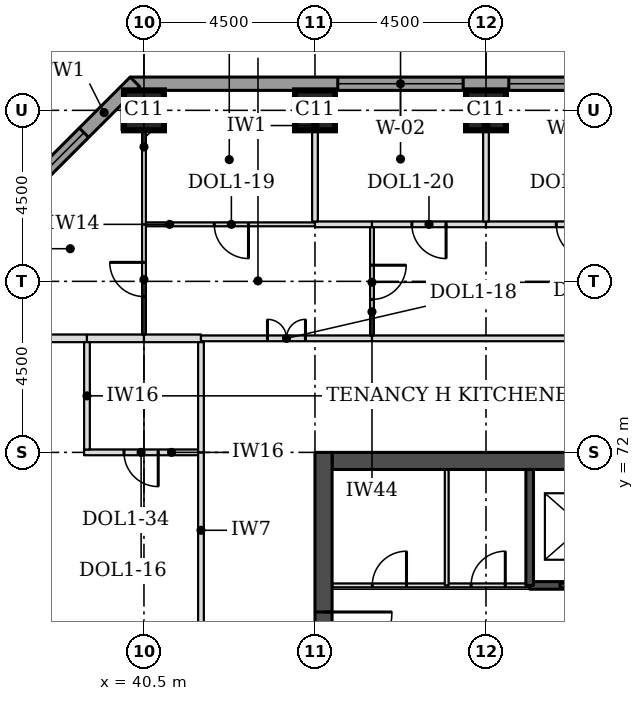
"""IFC4 building model, lengths in metres.
Left out: names, types, materials, properties, quantities, classifications, styles, units other than length and angle.
Written with IfcOpenShell. Run it as: python <this file> out.ifc"""

import sys

from ifc_helpers import new_model, si_unit, direction, frame, frame_2d, origin, origin_2d, place, context, subcontext, project, spatial, rectangle, extrude, element, fill, save


model = new_model("IFC4")
c1 = context("Model", 3, precision=1e-05, world=origin(), true_north=direction((0.0, 1.0)))
c2 = subcontext(c1, "Body", "Model", "MODEL_VIEW")
j1 = project(units=[si_unit("LENGTHUNIT", "METRE"), si_unit("PLANEANGLEUNIT", "RADIAN")], contexts=[c1])
p1 = place(None, origin())
s1 = spatial("IfcSite", under=j1, at=p1, CompositionType="ELEMENT")
p2 = place(p1, origin())
s2 = spatial("IfcBuilding", under=s1, at=p2, CompositionType="ELEMENT")
p3 = place(p2, frame((0.0, 0.0, 82.6)))
s3 = spatial("IfcBuildingStorey", under=s2, at=p3, CompositionType="ELEMENT", Elevation=82.6)
for number, where, z_axis, x_axis in (
    (1, (40.5, 81.0, 0.0), (0.0, 0.0, 1.0), (1.0, 0.0, 0.0)),
    (2, (45.0, 81.0, 0.0), (0.0, 0.0, 1.0), (1.0, 0.0, 0.0)),
    (3, (49.5, 81.0, 0.0), (0.0, 0.0, 1.0), (1.0, 0.0, 0.0)),
):
    element("IfcColumn", number, at=place(p3, frame(where, z_axis=z_axis, x_axis=x_axis)), inside=s3, PredefinedType="COLUMN", context=c2, shape_type="SweptSolid", body=[
        extrude(rectangle(XDim=1.05, YDim=1.05, at=origin_2d()), origin(), (0.0, 0.0, 1.0), 3.7),
    ])
p4 = place(p3, frame((45.45, 71.775, 0.0), z_axis=(0.0, 0.0, 1.0), x_axis=(1.0, 0.0, 0.0)))
e4 = element("IfcWall", 4, at=p4, inside=s3, PredefinedType="SHEAR", context=c2, shape_type="SweptSolid", body=[
    extrude(rectangle(XDim=21.6, YDim=0.45, at=frame_2d((10.8, 0.0))), origin(), (0.0, 0.0, 1.0), 3.7),
])
p5 = place(p3, frame((45.225, 49.5, 0.0), z_axis=(0.0, 0.0, 1.0), x_axis=(0.0, 1.0, 0.0)))
e5 = element("IfcWall", 5, at=p5, inside=s3, PredefinedType="SHEAR", context=c2, shape_type="SweptSolid", body=[
    extrude(rectangle(XDim=22.5, YDim=0.45, at=frame_2d((11.25, 0.0))), origin(), (0.0, 0.0, 1.0), 3.7),
])
p6 = place(p5, frame((4.2, 0.0, 0.0)))
e6 = element("IfcOpeningElement", 6, at=p6, cuts=e5, PredefinedType="OPENING", context=c2, shape_type="SweptSolid", body=[
    extrude(rectangle(XDim=1.8, YDim=2.1, at=frame_2d((0.9, 1.05))), frame((0.0, 0.235, 0.0), z_axis=(0.0, -1.0, 0.0), x_axis=(1.0, 0.0, 0.0)), (0.0, 0.0, 1.0), 0.47),
])
p7 = place(p5, frame((6.9, 0.0, 0.0)))
e7 = element("IfcOpeningElement", 7, at=p7, cuts=e5, PredefinedType="OPENING", context=c2, shape_type="SweptSolid", body=[
    extrude(rectangle(XDim=1.1, YDim=2.1, at=frame_2d((0.55, 1.05))), frame((0.0, 0.235, 0.0), z_axis=(0.0, -1.0, 0.0), x_axis=(1.0, 0.0, 0.0)), (0.0, 0.0, 1.0), 0.47),
])
p8 = place(p5, frame((13.6, 0.0, 0.0)))
e8 = element("IfcOpeningElement", 8, at=p8, cuts=e5, PredefinedType="OPENING", context=c2, shape_type="SweptSolid", body=[
    extrude(rectangle(XDim=1.1, YDim=2.1, at=frame_2d((0.55, 1.05))), frame((0.0, 0.235, 0.0), z_axis=(0.0, -1.0, 0.0), x_axis=(1.0, 0.0, 0.0)), (0.0, 0.0, 1.0), 0.47),
])
p9 = place(p5, frame((16.5, 0.0, 0.0)))
e9 = element("IfcOpeningElement", 9, at=p9, cuts=e5, PredefinedType="OPENING", context=c2, shape_type="SweptSolid", body=[
    extrude(rectangle(XDim=1.8, YDim=2.1, at=frame_2d((0.9, 1.05))), frame((0.0, 0.235, 0.0), z_axis=(0.0, -1.0, 0.0), x_axis=(1.0, 0.0, 0.0)), (0.0, 0.0, 1.0), 0.47),
])
p10 = place(p3, frame((72.362, 81.7, 0.0), z_axis=(0.0, 0.0, 1.0), x_axis=(-1.0, 0.0, 0.0)))
e10 = element("IfcWall", 10, at=p10, inside=s3, PredefinedType="STANDARD", context=c2, shape_type="SweptSolid", body=[
    extrude(rectangle(XDim=32.225, YDim=0.35, at=frame_2d((16.112, 0.0))), origin(), (0.0, 0.0, 1.0), 3.525),
])
p11 = place(p10, frame((5.462, 0.0, 0.9)))
e11 = element("IfcOpeningElement", 11, at=p11, cuts=e10, PredefinedType="OPENING", context=c2, shape_type="SweptSolid", body=[
    extrude(rectangle(XDim=3.3, YDim=1.9, at=frame_2d((1.65, 0.95))), frame((0.0, 0.185, 0.0), z_axis=(0.0, -1.0, 0.0), x_axis=(1.0, 0.0, 0.0)), (0.0, 0.0, 1.0), 0.37),
])
p12 = place(p10, frame((9.962, 0.0, 0.9)))
e12 = element("IfcOpeningElement", 12, at=p12, cuts=e10, PredefinedType="OPENING", context=c2, shape_type="SweptSolid", body=[
    extrude(rectangle(XDim=3.3, YDim=1.9, at=frame_2d((1.65, 0.95))), frame((0.0, 0.185, 0.0), z_axis=(0.0, -1.0, 0.0), x_axis=(1.0, 0.0, 0.0)), (0.0, 0.0, 1.0), 0.37),
])
p13 = place(p10, frame((14.462, 0.0, 0.9)))
e13 = element("IfcOpeningElement", 13, at=p13, cuts=e10, PredefinedType="OPENING", context=c2, shape_type="SweptSolid", body=[
    extrude(rectangle(XDim=3.3, YDim=1.9, at=frame_2d((1.65, 0.95))), frame((0.0, 0.185, 0.0), z_axis=(0.0, -1.0, 0.0), x_axis=(1.0, 0.0, 0.0)), (0.0, 0.0, 1.0), 0.37),
])
p14 = place(p10, frame((18.962, 0.0, 0.9)))
e14 = element("IfcOpeningElement", 14, at=p14, cuts=e10, PredefinedType="OPENING", context=c2, shape_type="SweptSolid", body=[
    extrude(rectangle(XDim=3.3, YDim=1.9, at=frame_2d((1.65, 0.95))), frame((0.0, 0.185, 0.0), z_axis=(0.0, -1.0, 0.0), x_axis=(1.0, 0.0, 0.0)), (0.0, 0.0, 1.0), 0.37),
])
p15 = place(p10, frame((23.462, 0.0, 0.9)))
e15 = element("IfcOpeningElement", 15, at=p15, cuts=e10, PredefinedType="OPENING", context=c2, shape_type="SweptSolid", body=[
    extrude(rectangle(XDim=3.3, YDim=1.9, at=frame_2d((1.65, 0.95))), frame((0.0, 0.185, 0.0), z_axis=(0.0, -1.0, 0.0), x_axis=(1.0, 0.0, 0.0)), (0.0, 0.0, 1.0), 0.37),
])
p16 = place(p3, frame((40.261, 81.751, 0.0), z_axis=(0.0, 0.0, 1.0), x_axis=(-0.707106781187, -0.707106781187, 0.0)))
e16 = element("IfcWall", 16, at=p16, inside=s3, PredefinedType="STANDARD", context=c2, shape_type="SweptSolid", body=[
    extrude(rectangle(XDim=7.089, YDim=0.35, at=frame_2d((3.544, 0.0))), origin(), (0.0, 0.0, 1.0), 3.525),
])
p17 = place(p16, frame((1.894, 0.0, 0.9)))
e17 = element("IfcOpeningElement", 17, at=p17, cuts=e16, PredefinedType="OPENING", context=c2, shape_type="SweptSolid", body=[
    extrude(rectangle(XDim=3.3, YDim=1.9, at=frame_2d((1.65, 0.95))), frame((0.0, 0.185, 0.0), z_axis=(0.0, -1.0, 0.0), x_axis=(1.0, 0.0, 0.0)), (0.0, 0.0, 1.0), 0.37),
])
p18 = place(p3, frame((38.925, 72.0, 0.0), z_axis=(0.0, 0.0, 1.0), x_axis=(1.0, 0.0, 0.0)))
e18 = element("IfcWall", 18, at=p18, inside=s3, PredefinedType="PARTITIONING", context=c2, shape_type="SweptSolid", body=[
    extrude(rectangle(XDim=3.0, YDim=0.15, at=frame_2d((1.5, 0.0))), origin(), (0.0, 0.0, 1.0), 3.55),
])
p19 = place(p18, frame((1.05, 0.0, 0.0)))
e19 = element("IfcOpeningElement", 19, at=p19, cuts=e18, PredefinedType="OPENING", context=c2, shape_type="SweptSolid", body=[
    extrude(rectangle(XDim=0.9, YDim=2.1, at=frame_2d((0.45, 1.05))), frame((0.0, 0.085, 0.0), z_axis=(0.0, -1.0, 0.0), x_axis=(1.0, 0.0, 0.0)), (0.0, 0.0, 1.0), 0.17),
])
p20 = place(p3, frame((35.475, 75.0, 0.0), z_axis=(0.0, 0.0, 1.0), x_axis=(1.0, 0.0, 0.0)))
e20 = element("IfcWall", 20, at=p20, inside=s3, PredefinedType="PARTITIONING", context=c2, shape_type="SweptSolid", body=[
    extrude(rectangle(XDim=3.525, YDim=0.2, at=frame_2d((1.762, 0.0))), origin(), (0.0, 0.0, 1.0), 3.55),
])
for number, where, z_axis, x_axis in (
    (21, (39.0, 75.0, 0.0), (0.0, 0.0, 1.0), (1.0, 0.0, 0.0)),
    (22, (40.5, 75.0, 0.0), (0.0, 0.0, 1.0), (1.0, 0.0, 0.0)),
):
    element("IfcWall", number, at=place(p3, frame(where, z_axis=z_axis, x_axis=x_axis)), inside=s3, PredefinedType="PARTITIONING", context=c2, shape_type="SweptSolid", body=[
        extrude(rectangle(XDim=1.5, YDim=0.2, at=frame_2d((0.75, 0.0))), origin(), (0.0, 0.0, 1.0), 3.55),
    ])
p21 = place(p3, frame((42.0, 75.0, 0.0), z_axis=(0.0, 0.0, 1.0), x_axis=(1.0, 0.0, 0.0)))
e23 = element("IfcWall", 23, at=p21, inside=s3, PredefinedType="PARTITIONING", context=c2, shape_type="SweptSolid", body=[
    extrude(rectangle(XDim=4.5, YDim=0.15, at=frame_2d((2.25, 0.0))), origin(), (0.0, 0.0, 1.0), 3.55),
])
p22 = place(p21, frame((1.75, 0.0, 0.0)))
e24 = element("IfcOpeningElement", 24, at=p22, cuts=e23, PredefinedType="OPENING", context=c2, shape_type="SweptSolid", body=[
    extrude(rectangle(XDim=1.0, YDim=2.1, at=frame_2d((0.5, 1.05))), frame((0.0, 0.085, 0.0), z_axis=(0.0, -1.0, 0.0), x_axis=(1.0, 0.0, 0.0)), (0.0, 0.0, 1.0), 0.17),
])
p23 = place(p3, frame((46.5, 75.0, 0.0), z_axis=(0.0, 0.0, 1.0), x_axis=(1.0, 0.0, 0.0)))
e25 = element("IfcWall", 25, at=p23, inside=s3, PredefinedType="PARTITIONING", context=c2, shape_type="SweptSolid", body=[
    extrude(rectangle(XDim=24.0, YDim=0.15, at=frame_2d((12.0, 0.0))), origin(), (0.0, 0.0, 1.0), 3.55),
])
p24 = place(p3, frame((40.55, 78.0, 0.0), z_axis=(0.0, 0.0, 1.0), x_axis=(1.0, 0.0, 0.0)))
e26 = element("IfcWall", 26, at=p24, inside=s3, PredefinedType="PARTITIONING", context=c2, shape_type="SweptSolid", body=[
    extrude(rectangle(XDim=4.45, YDim=0.1, at=frame_2d((2.225, 0.0))), origin(), (0.0, 0.0, 1.0), 3.55),
])
p25 = place(p24, frame((1.8, 0.0, 0.0)))
e27 = element("IfcOpeningElement", 27, at=p25, cuts=e26, PredefinedType="OPENING", context=c2, shape_type="SweptSolid", body=[
    extrude(rectangle(XDim=0.9, YDim=2.1, at=frame_2d((0.45, 1.05))), frame((0.0, 0.06, 0.0), z_axis=(0.0, -1.0, 0.0), x_axis=(1.0, 0.0, 0.0)), (0.0, 0.0, 1.0), 0.12),
])
p26 = place(p3, frame((45.0, 78.0, 0.0), z_axis=(0.0, 0.0, 1.0), x_axis=(1.0, 0.0, 0.0)))
e28 = element("IfcWall", 28, at=p26, inside=s3, PredefinedType="PARTITIONING", context=c2, shape_type="SweptSolid", body=[
    extrude(rectangle(XDim=1.5, YDim=0.15, at=frame_2d((0.75, 0.0))), origin(), (0.0, 0.0, 1.0), 3.55),
])
p27 = place(p3, frame((46.5, 78.0, 0.0), z_axis=(0.0, 0.0, 1.0), x_axis=(1.0, 0.0, 0.0)))
e29 = element("IfcWall", 29, at=p27, inside=s3, PredefinedType="PARTITIONING", context=c2, shape_type="SweptSolid", body=[
    extrude(rectangle(XDim=3.0, YDim=0.15, at=frame_2d((1.5, 0.0))), origin(), (0.0, 0.0, 1.0), 3.55),
])
p28 = place(p27, frame((1.05, 0.0, 0.0)))
e30 = element("IfcOpeningElement", 30, at=p28, cuts=e29, PredefinedType="OPENING", context=c2, shape_type="SweptSolid", body=[
    extrude(rectangle(XDim=0.9, YDim=2.1, at=frame_2d((0.45, 1.05))), frame((0.0, 0.085, 0.0), z_axis=(0.0, -1.0, 0.0), x_axis=(1.0, 0.0, 0.0)), (0.0, 0.0, 1.0), 0.17),
])
p29 = place(p3, frame((49.5, 78.0, 0.0), z_axis=(0.0, 0.0, 1.0), x_axis=(1.0, 0.0, 0.0)))
e31 = element("IfcWall", 31, at=p29, inside=s3, PredefinedType="PARTITIONING", context=c2, shape_type="SweptSolid", body=[
    extrude(rectangle(XDim=4.575, YDim=0.15, at=frame_2d((2.288, 0.0))), origin(), (0.0, 0.0, 1.0), 3.55),
])
p30 = place(p29, frame((1.85, 0.0, 0.0)))
e32 = element("IfcOpeningElement", 32, at=p30, cuts=e31, PredefinedType="OPENING", context=c2, shape_type="SweptSolid", body=[
    extrude(rectangle(XDim=0.9, YDim=2.1, at=frame_2d((0.45, 1.05))), frame((0.0, 0.085, 0.0), z_axis=(0.0, -1.0, 0.0), x_axis=(1.0, 0.0, 0.0)), (0.0, 0.0, 1.0), 0.17),
])
p31 = place(p3, frame((42.0, 61.5, 0.0), z_axis=(0.0, 0.0, 1.0), x_axis=(0.0, 1.0, 0.0)))
e33 = element("IfcWall", 33, at=p31, inside=s3, PredefinedType="PARTITIONING", context=c2, shape_type="SweptSolid", body=[
    extrude(rectangle(XDim=10.5, YDim=0.15, at=frame_2d((5.25, 0.0))), origin(), (0.0, 0.0, 1.0), 3.55),
])
p32 = place(p3, frame((42.0, 72.0, 0.0), z_axis=(0.0, 0.0, 1.0), x_axis=(0.0, 1.0, 0.0)))
e34 = element("IfcWall", 34, at=p32, inside=s3, PredefinedType="PARTITIONING", context=c2, shape_type="SweptSolid", body=[
    extrude(rectangle(XDim=2.9, YDim=0.15, at=frame_2d((1.45, 0.0))), origin(), (0.0, 0.0, 1.0), 3.55),
])
p33 = place(p3, frame((39.0, 72.075, 0.0), z_axis=(0.0, 0.0, 1.0), x_axis=(0.0, 1.0, 0.0)))
e35 = element("IfcWall", 35, at=p33, inside=s3, PredefinedType="PARTITIONING", context=c2, shape_type="SweptSolid", body=[
    extrude(rectangle(XDim=2.825, YDim=0.15, at=frame_2d((1.413, 0.0))), origin(), (0.0, 0.0, 1.0), 3.55),
])
p34 = place(p3, frame((46.5, 75.075, 0.0), z_axis=(0.0, 0.0, 1.0), x_axis=(0.0, 1.0, 0.0)))
e36 = element("IfcWall", 36, at=p34, inside=s3, PredefinedType="PARTITIONING", context=c2, shape_type="SweptSolid", body=[
    extrude(rectangle(XDim=2.85, YDim=0.1, at=frame_2d((1.425, 0.0))), origin(), (0.0, 0.0, 1.0), 3.022),
])
p35 = place(p34, frame((0.95, 0.0, 0.0)))
e37 = element("IfcOpeningElement", 37, at=p35, cuts=e36, PredefinedType="OPENING", context=c2, shape_type="SweptSolid", body=[
    extrude(rectangle(XDim=0.9, YDim=2.1, at=frame_2d((0.45, 1.05))), frame((0.0, 0.06, 0.0), z_axis=(0.0, -1.0, 0.0), x_axis=(1.0, 0.0, 0.0)), (0.0, 0.0, 1.0), 0.12),
])
p36 = place(p3, frame((40.5, 75.1, 0.0), z_axis=(0.0, 0.0, 1.0), x_axis=(0.0, 1.0, 0.0)))
e38 = element("IfcWall", 38, at=p36, inside=s3, PredefinedType="PARTITIONING", context=c2, shape_type="SweptSolid", body=[
    extrude(rectangle(XDim=2.9, YDim=0.1, at=frame_2d((1.45, 0.0))), origin(), (0.0, 0.0, 1.0), 3.55),
])
p37 = place(p36, frame((1.0, 0.0, 0.0)))
e39 = element("IfcOpeningElement", 39, at=p37, cuts=e38, PredefinedType="OPENING", context=c2, shape_type="SweptSolid", body=[
    extrude(rectangle(XDim=0.9, YDim=2.1, at=frame_2d((0.45, 1.05))), frame((0.0, 0.06, 0.0), z_axis=(0.0, -1.0, 0.0), x_axis=(1.0, 0.0, 0.0)), (0.0, 0.0, 1.0), 0.12),
])
p38 = place(p3, frame((40.5, 78.0, 0.0), z_axis=(0.0, 0.0, 1.0), x_axis=(0.0, 1.0, 0.0)))
e40 = element("IfcWall", 40, at=p38, inside=s3, PredefinedType="PARTITIONING", context=c2, shape_type="SweptSolid", body=[
    extrude(rectangle(XDim=2.475, YDim=0.1, at=frame_2d((1.238, 0.0))), origin(), (0.0, 0.0, 1.0), 3.55),
])
for number, where, z_axis, x_axis in (
    (41, (45.0, 78.075, 0.0), (0.0, 0.0, 1.0), (0.0, 1.0, 0.0)),
    (42, (49.5, 78.075, 0.0), (0.0, 0.0, 1.0), (0.0, 1.0, 0.0)),
):
    element("IfcWall", number, at=place(p3, frame(where, z_axis=z_axis, x_axis=x_axis)), inside=s3, PredefinedType="PARTITIONING", context=c2, shape_type="SweptSolid", body=[
        extrude(rectangle(XDim=3.45, YDim=0.15, at=frame_2d((1.725, 0.0))), origin(), (0.0, 0.0, 1.0), 3.55),
    ])
p39 = place(p3, frame((45.45, 68.5, 0.0), z_axis=(0.0, 0.0, 1.0), x_axis=(1.0, 0.0, 0.0)))
e43 = element("IfcWall", 43, at=p39, inside=s3, PredefinedType="PARTITIONING", context=c2, shape_type="SweptSolid", body=[
    extrude(rectangle(XDim=5.2, YDim=0.1, at=frame_2d((2.6, 0.0))), origin(), (0.0, 0.0, 1.0), 3.55),
])
p40 = place(p39, frame((1.058, 0.0, 0.0)))
e44 = element("IfcOpeningElement", 44, at=p40, cuts=e43, PredefinedType="OPENING", context=c2, shape_type="SweptSolid", body=[
    extrude(rectangle(XDim=0.9, YDim=2.1, at=frame_2d((0.45, 1.05))), frame((0.0, 0.06, 0.0), z_axis=(0.0, -1.0, 0.0), x_axis=(1.0, 0.0, 0.0)), (0.0, 0.0, 1.0), 0.12),
])
p41 = place(p39, frame((3.658, 0.0, 0.0)))
e45 = element("IfcOpeningElement", 45, at=p41, cuts=e43, PredefinedType="OPENING", context=c2, shape_type="SweptSolid", body=[
    extrude(rectangle(XDim=0.9, YDim=2.1, at=frame_2d((0.45, 1.05))), frame((0.0, 0.06, 0.0), z_axis=(0.0, -1.0, 0.0), x_axis=(1.0, 0.0, 0.0)), (0.0, 0.0, 1.0), 0.12),
])
p42 = place(p3, frame((50.65, 68.5, 0.0), z_axis=(0.0, 0.0, 1.0), x_axis=(1.0, 0.0, 0.0)))
e46 = element("IfcWall", 46, at=p42, inside=s3, PredefinedType="SOLIDWALL", context=c2, shape_type="SweptSolid", body=[
    extrude(rectangle(XDim=11.2, YDim=0.2, at=frame_2d((5.6, 0.0))), origin(), (0.0, 0.0, 1.0), 3.55),
])
p43 = place(p42, frame((0.8, 0.0, 0.0)))
e47 = element("IfcOpeningElement", 47, at=p43, cuts=e46, PredefinedType="OPENING", context=c2, shape_type="SweptSolid", body=[
    extrude(rectangle(XDim=1.2, YDim=2.1, at=frame_2d((0.6, 1.05))), frame((0.0, 0.11, 0.0), z_axis=(0.0, -1.0, 0.0), x_axis=(1.0, 0.0, 0.0)), (0.0, 0.0, 1.0), 0.22),
])
p44 = place(p42, frame((3.6, 0.0, 0.0)))
e48 = element("IfcOpeningElement", 48, at=p44, cuts=e46, PredefinedType="OPENING", context=c2, shape_type="SweptSolid", body=[
    extrude(rectangle(XDim=1.2, YDim=2.1, at=frame_2d((0.6, 1.05))), frame((0.0, 0.11, 0.0), z_axis=(0.0, -1.0, 0.0), x_axis=(1.0, 0.0, 0.0)), (0.0, 0.0, 1.0), 0.22),
])
p45 = place(p42, frame((6.4, 0.0, 0.0)))
e49 = element("IfcOpeningElement", 49, at=p45, cuts=e46, PredefinedType="OPENING", context=c2, shape_type="SweptSolid", body=[
    extrude(rectangle(XDim=1.2, YDim=2.1, at=frame_2d((0.6, 1.05))), frame((0.0, 0.11, 0.0), z_axis=(0.0, -1.0, 0.0), x_axis=(1.0, 0.0, 0.0)), (0.0, 0.0, 1.0), 0.22),
])
p46 = place(p42, frame((9.2, 0.0, 0.0)))
e50 = element("IfcOpeningElement", 50, at=p46, cuts=e46, PredefinedType="OPENING", context=c2, shape_type="SweptSolid", body=[
    extrude(rectangle(XDim=1.2, YDim=2.1, at=frame_2d((0.6, 1.05))), frame((0.0, 0.11, 0.0), z_axis=(0.0, -1.0, 0.0), x_axis=(1.0, 0.0, 0.0)), (0.0, 0.0, 1.0), 0.22),
])
p47 = place(p3, frame((48.466, 68.5, 0.0), z_axis=(0.0, 0.0, 1.0), x_axis=(0.0, 1.0, 0.0)))
e51 = element("IfcWall", 51, at=p47, inside=s3, PredefinedType="PARTITIONING", context=c2, shape_type="SweptSolid", body=[
    extrude(rectangle(XDim=3.05, YDim=0.1, at=frame_2d((1.525, 0.0))), origin(), (0.0, 0.0, 1.0), 3.55),
])
p48 = place(p3, frame((50.65, 68.5, 0.0), z_axis=(0.0, 0.0, 1.0), x_axis=(0.0, 1.0, 0.0)))
e52 = element("IfcWall", 52, at=p48, inside=s3, PredefinedType="SOLIDWALL", context=c2, shape_type="SweptSolid", body=[
    extrude(rectangle(XDim=3.05, YDim=0.2, at=frame_2d((1.525, 0.0))), origin(), (0.0, 0.0, 1.0), 3.55),
])
p49 = place(p14, origin())
e53 = element("IfcWindow", 53, at=p49, inside=s3, PartitioningType="SINGLE_PANEL", PredefinedType="WINDOW", context=c2, shape_type="SweptSolid", body=[
    extrude(rectangle(XDim=3.3, YDim=1.9, at=frame_2d((1.65, 0.95))), frame((0.0, 0.085, 0.0), z_axis=(0.0, -1.0, 0.0), x_axis=(1.0, 0.0, 0.0)), (0.0, 0.0, 1.0), 0.06),
])
fill(e14, e53)
p50 = place(p15, origin())
e54 = element("IfcWindow", 54, at=p50, inside=s3, PartitioningType="SINGLE_PANEL", PredefinedType="WINDOW", context=c2, shape_type="SweptSolid", body=[
    extrude(rectangle(XDim=3.3, YDim=1.9, at=frame_2d((1.65, 0.95))), frame((0.0, 0.085, 0.0), z_axis=(0.0, -1.0, 0.0), x_axis=(1.0, 0.0, 0.0)), (0.0, 0.0, 1.0), 0.06),
])
fill(e15, e54)
p51 = place(p17, origin())
e55 = element("IfcWindow", 55, at=p51, inside=s3, PartitioningType="SINGLE_PANEL", PredefinedType="WINDOW", context=c2, shape_type="SweptSolid", body=[
    extrude(rectangle(XDim=3.3, YDim=1.9, at=frame_2d((1.65, 0.95))), frame((0.0, 0.085, 0.0), z_axis=(0.0, -1.0, 0.0), x_axis=(1.0, 0.0, 0.0)), (0.0, 0.0, 1.0), 0.06),
])
fill(e17, e55)
p52 = place(p22, origin())
e56 = element("IfcDoor", 56, at=p52, inside=s3, OperationType="DOUBLE_DOOR_SINGLE_SWING", PredefinedType="DOOR", context=c2, shape_type="SweptSolid", body=[
    extrude(rectangle(XDim=1.0, YDim=2.1, at=frame_2d((0.5, 1.05))), frame((0.0, 0.025, 0.0), z_axis=(0.0, -1.0, 0.0), x_axis=(1.0, 0.0, 0.0)), (0.0, 0.0, 1.0), 0.05),
])
fill(e24, e56)
p53 = place(p35, frame((0.9, 0.0, 0.0), z_axis=(0.0, 0.0, 1.0), x_axis=(-1.0, 0.0, 0.0)))
e57 = element("IfcDoor", 57, at=p53, inside=s3, OperationType="SINGLE_SWING_LEFT", PredefinedType="DOOR", context=c2, shape_type="SweptSolid", body=[
    extrude(rectangle(XDim=0.9, YDim=2.1, at=frame_2d((0.45, 1.05))), frame((0.0, 0.025, 0.0), z_axis=(0.0, -1.0, 0.0), x_axis=(1.0, 0.0, 0.0)), (0.0, 0.0, 1.0), 0.05),
])
fill(e37, e57)
p54 = place(p37, origin())
e58 = element("IfcDoor", 58, at=p54, inside=s3, OperationType="SINGLE_SWING_RIGHT", PredefinedType="DOOR", context=c2, shape_type="SweptSolid", body=[
    extrude(rectangle(XDim=0.9, YDim=2.1, at=frame_2d((0.45, 1.05))), frame((0.0, 0.025, 0.0), z_axis=(0.0, -1.0, 0.0), x_axis=(1.0, 0.0, 0.0)), (0.0, 0.0, 1.0), 0.05),
])
fill(e39, e58)
p55 = place(p25, frame((0.9, 0.0, 0.0), z_axis=(0.0, 0.0, 1.0), x_axis=(-1.0, 0.0, 0.0)))
e59 = element("IfcDoor", 59, at=p55, inside=s3, OperationType="SINGLE_SWING_LEFT", PredefinedType="DOOR", context=c2, shape_type="SweptSolid", body=[
    extrude(rectangle(XDim=0.9, YDim=2.1, at=frame_2d((0.45, 1.05))), frame((0.0, 0.025, 0.0), z_axis=(0.0, -1.0, 0.0), x_axis=(1.0, 0.0, 0.0)), (0.0, 0.0, 1.0), 0.05),
])
fill(e27, e59)
p56 = place(p28, frame((0.9, 0.0, 0.0), z_axis=(0.0, 0.0, 1.0), x_axis=(-1.0, 0.0, 0.0)))
e60 = element("IfcDoor", 60, at=p56, inside=s3, OperationType="SINGLE_SWING_LEFT", PredefinedType="DOOR", context=c2, shape_type="SweptSolid", body=[
    extrude(rectangle(XDim=0.9, YDim=2.1, at=frame_2d((0.45, 1.05))), frame((0.0, 0.025, 0.0), z_axis=(0.0, -1.0, 0.0), x_axis=(1.0, 0.0, 0.0)), (0.0, 0.0, 1.0), 0.05),
])
fill(e30, e60)
p57 = place(p30, frame((0.9, 0.0, 0.0), z_axis=(0.0, 0.0, 1.0), x_axis=(-1.0, 0.0, 0.0)))
e61 = element("IfcDoor", 61, at=p57, inside=s3, OperationType="SINGLE_SWING_LEFT", PredefinedType="DOOR", context=c2, shape_type="SweptSolid", body=[
    extrude(rectangle(XDim=0.9, YDim=2.1, at=frame_2d((0.45, 1.05))), frame((0.0, 0.025, 0.0), z_axis=(0.0, -1.0, 0.0), x_axis=(1.0, 0.0, 0.0)), (0.0, 0.0, 1.0), 0.05),
])
fill(e32, e61)
p58 = place(p19, frame((0.9, 0.0, 0.0), z_axis=(0.0, 0.0, 1.0), x_axis=(-1.0, 0.0, 0.0)))
e62 = element("IfcDoor", 62, at=p58, inside=s3, OperationType="SINGLE_SWING_LEFT", PredefinedType="DOOR", context=c2, shape_type="SweptSolid", body=[
    extrude(rectangle(XDim=0.9, YDim=2.1, at=frame_2d((0.45, 1.05))), frame((0.0, 0.025, 0.0), z_axis=(0.0, -1.0, 0.0), x_axis=(1.0, 0.0, 0.0)), (0.0, 0.0, 1.0), 0.05),
])
fill(e19, e62)
p59 = place(p43, origin())
e63 = element("IfcDoor", 63, at=p59, inside=s3, OperationType="DOUBLE_DOOR_SLIDING", PredefinedType="DOOR", context=c2, shape_type="SweptSolid", body=[
    extrude(rectangle(XDim=1.2, YDim=2.1, at=frame_2d((0.6, 1.05))), frame((0.0, 0.025, 0.0), z_axis=(0.0, -1.0, 0.0), x_axis=(1.0, 0.0, 0.0)), (0.0, 0.0, 1.0), 0.05),
])
fill(e47, e63)
p60 = place(p9, frame((1.8, 0.0, 0.0), z_axis=(0.0, 0.0, 1.0), x_axis=(-1.0, 0.0, 0.0)))
e64 = element("IfcDoor", 64, at=p60, inside=s3, OperationType="SINGLE_SWING_LEFT", PredefinedType="DOOR", context=c2, shape_type="SweptSolid", body=[
    extrude(rectangle(XDim=1.8, YDim=2.1, at=frame_2d((0.9, 1.05))), frame((0.0, 0.025, 0.0), z_axis=(0.0, -1.0, 0.0), x_axis=(1.0, 0.0, 0.0)), (0.0, 0.0, 1.0), 0.05),
])
fill(e9, e64)
p61 = place(p40, origin())
e65 = element("IfcDoor", 65, at=p61, inside=s3, OperationType="SINGLE_SWING_RIGHT", PredefinedType="DOOR", context=c2, shape_type="SweptSolid", body=[
    extrude(rectangle(XDim=0.9, YDim=2.1, at=frame_2d((0.45, 1.05))), frame((0.0, 0.025, 0.0), z_axis=(0.0, -1.0, 0.0), x_axis=(1.0, 0.0, 0.0)), (0.0, 0.0, 1.0), 0.05),
])
fill(e44, e65)
p62 = place(p41, origin())
e66 = element("IfcDoor", 66, at=p62, inside=s3, OperationType="SINGLE_SWING_RIGHT", PredefinedType="DOOR", context=c2, shape_type="SweptSolid", body=[
    extrude(rectangle(XDim=0.9, YDim=2.1, at=frame_2d((0.45, 1.05))), frame((0.0, 0.025, 0.0), z_axis=(0.0, -1.0, 0.0), x_axis=(1.0, 0.0, 0.0)), (0.0, 0.0, 1.0), 0.05),
])
fill(e45, e66)
save(model, sys.argv[1])
